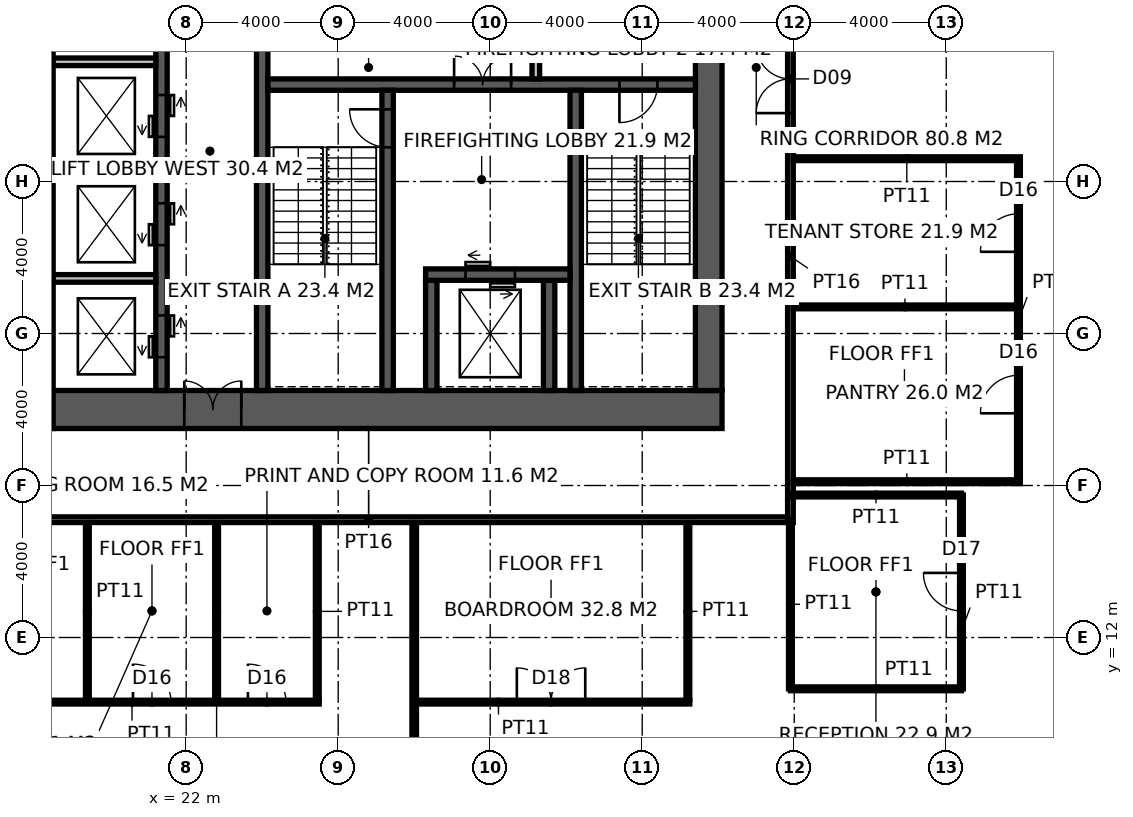
"""IFC4 building model, lengths in metres.
Left out: names, types, materials, properties, quantities, classifications, styles, units other than length and angle.
Written with IfcOpenShell. Run it as: python <this file> out.ifc"""

import sys

from ifc_helpers import new_model, si_unit, direction, frame, frame_2d, origin, place, context, subcontext, project, spatial, rectangle, extrude, element, fill, save


model = new_model("IFC4")
c1 = context("Model", 3, precision=1e-05, world=origin(), true_north=direction((0.0, 1.0)))
c2 = subcontext(c1, "Body", "Model", "MODEL_VIEW")
j1 = project(units=[si_unit("LENGTHUNIT", "METRE"), si_unit("PLANEANGLEUNIT", "RADIAN")], contexts=[c1])
p1 = place(None, origin())
s1 = spatial("IfcSite", under=j1, at=p1, CompositionType="ELEMENT")
p2 = place(p1, origin())
s2 = spatial("IfcBuilding", under=s1, at=p2, CompositionType="ELEMENT")
p3 = place(p2, frame((0.0, 0.0, 81.4)))
s3 = spatial("IfcBuildingStorey", under=s2, at=p3, CompositionType="ELEMENT", Elevation=81.4)
p4 = place(p3, frame((18.0, 17.5, -0.15), z_axis=(0.0, 0.0, 1.0), x_axis=(0.0, 1.0, 0.0)))
e1 = element("IfcWall", 1, at=p4, inside=s3, PredefinedType="SHEAR", context=c2, shape_type="SweptSolid", body=[
    extrude(rectangle(XDim=19.0, YDim=1.0, at=frame_2d((9.5, 0.0))), origin(), (0.0, 0.0, 1.0), 4.0),
])
p5 = place(p3, frame((18.5, 18.0, -0.15), z_axis=(0.0, 0.0, 1.0), x_axis=(1.0, 0.0, 0.0)))
e2 = element("IfcWall", 2, at=p5, inside=s3, PredefinedType="SHEAR", context=c2, shape_type="SweptSolid", body=[
    extrude(rectangle(XDim=17.6, YDim=1.0, at=frame_2d((8.8, 0.0))), origin(), (0.0, 0.0, 1.0), 4.0),
])
p6 = place(p5, frame((3.45, 0.0, 0.15)))
e3 = element("IfcOpeningElement", 3, at=p6, cuts=e2, PredefinedType="OPENING", context=c2, shape_type="SweptSolid", body=[
    extrude(rectangle(XDim=1.5, YDim=2.4, at=frame_2d((0.75, 1.2))), frame((0.0, 0.51, 0.0), z_axis=(0.0, -1.0, 0.0), x_axis=(1.0, 0.0, 0.0)), (0.0, 0.0, 1.0), 1.02),
])
p7 = place(p3, frame((35.75, 18.5, -0.15), z_axis=(0.0, 0.0, 1.0), x_axis=(0.0, 1.0, 0.0)))
e4 = element("IfcWall", 4, at=p7, inside=s3, PredefinedType="SHEAR", context=c2, shape_type="SweptSolid", body=[
    extrude(rectangle(XDim=17.0, YDim=0.7, at=frame_2d((8.5, 0.0))), origin(), (0.0, 0.0, 1.0), 4.0),
])
p8 = place(p7, frame((9.85, 0.0, 0.15)))
e5 = element("IfcOpeningElement", 5, at=p8, cuts=e4, PredefinedType="OPENING", context=c2, shape_type="SweptSolid", body=[
    extrude(rectangle(XDim=1.0, YDim=2.2, at=frame_2d((0.5, 1.1))), frame((0.0, 0.36, 0.0), z_axis=(0.0, -1.0, 0.0), x_axis=(1.0, 0.0, 0.0)), (0.0, 0.0, 1.0), 0.72),
])
p9 = place(p3, frame((24.0, 18.5, -0.15), z_axis=(0.0, 0.0, 1.0), x_axis=(0.0, 1.0, 0.0)))
e6 = element("IfcWall", 6, at=p9, inside=s3, PredefinedType="SHEAR", context=c2, shape_type="SweptSolid", body=[
    extrude(rectangle(XDim=17.0, YDim=0.3, at=frame_2d((8.5, 0.0))), origin(), (0.0, 0.0, 1.0), 4.0),
])
p10 = place(p9, frame((9.6, 0.0, 0.15)))
e7 = element("IfcOpeningElement", 7, at=p10, cuts=e6, PredefinedType="OPENING", context=c2, shape_type="SweptSolid", body=[
    extrude(rectangle(XDim=1.5, YDim=2.4, at=frame_2d((0.75, 1.2))), frame((0.0, 0.16, 0.0), z_axis=(0.0, -1.0, 0.0), x_axis=(1.0, 0.0, 0.0)), (0.0, 0.0, 1.0), 0.32),
])
p11 = place(p3, frame((24.15, 26.55, -0.15), z_axis=(0.0, 0.0, 1.0), x_axis=(1.0, 0.0, 0.0)))
e8 = element("IfcWall", 8, at=p11, inside=s3, PredefinedType="SHEAR", context=c2, shape_type="SweptSolid", body=[
    extrude(rectangle(XDim=11.25, YDim=0.3, at=frame_2d((5.625, 0.0))), origin(), (0.0, 0.0, 1.0), 4.0),
])
p12 = place(p11, frame((9.25, 0.0, 0.15)))
e9 = element("IfcOpeningElement", 9, at=p12, cuts=e8, PredefinedType="OPENING", context=c2, shape_type="SweptSolid", body=[
    extrude(rectangle(XDim=1.0, YDim=2.2, at=frame_2d((0.5, 1.1))), frame((0.0, 0.16, 0.0), z_axis=(0.0, -1.0, 0.0), x_axis=(1.0, 0.0, 0.0)), (0.0, 0.0, 1.0), 0.32),
])
p13 = place(p11, frame((4.9, 0.0, 0.15)))
e10 = element("IfcOpeningElement", 10, at=p13, cuts=e8, PredefinedType="OPENING", context=c2, shape_type="SweptSolid", body=[
    extrude(rectangle(XDim=1.5, YDim=2.4, at=frame_2d((0.75, 1.2))), frame((0.0, 0.16, 0.0), z_axis=(0.0, -1.0, 0.0), x_axis=(1.0, 0.0, 0.0)), (0.0, 0.0, 1.0), 0.32),
])
p14 = place(p3, frame((27.3, 18.5, -0.15), z_axis=(0.0, 0.0, 1.0), x_axis=(0.0, 1.0, 0.0)))
e11 = element("IfcWall", 11, at=p14, inside=s3, PredefinedType="SHEAR", context=c2, shape_type="SweptSolid", body=[
    extrude(rectangle(XDim=7.9, YDim=0.3, at=frame_2d((3.95, 0.0))), origin(), (0.0, 0.0, 1.0), 4.0),
])
p15 = place(p14, frame((6.4, 0.0, 0.15)))
e12 = element("IfcOpeningElement", 12, at=p15, cuts=e11, PredefinedType="OPENING", context=c2, shape_type="SweptSolid", body=[
    extrude(rectangle(XDim=1.0, YDim=2.2, at=frame_2d((0.5, 1.1))), frame((0.0, 0.16, 0.0), z_axis=(0.0, -1.0, 0.0), x_axis=(1.0, 0.0, 0.0)), (0.0, 0.0, 1.0), 0.32),
])
p16 = place(p3, frame((32.25, 18.5, -0.15), z_axis=(0.0, 0.0, 1.0), x_axis=(0.0, 1.0, 0.0)))
e13 = element("IfcWall", 13, at=p16, inside=s3, PredefinedType="SHEAR", context=c2, shape_type="SweptSolid", body=[
    extrude(rectangle(XDim=7.9, YDim=0.3, at=frame_2d((3.95, 0.0))), origin(), (0.0, 0.0, 1.0), 4.0),
])
for number, where, z_axis, x_axis in (
    (14, (28.45, 18.5, -0.15), (0.0, 0.0, 1.0), (0.0, 1.0, 0.0)),
    (15, (31.55, 18.5, -0.15), (0.0, 0.0, 1.0), (0.0, 1.0, 0.0)),
):
    element("IfcWall", number, at=place(p3, frame(where, z_axis=z_axis, x_axis=x_axis)), inside=s3, PredefinedType="SHEAR", context=c2, shape_type="SweptSolid", body=[
        extrude(rectangle(XDim=2.9, YDim=0.3, at=frame_2d((1.45, 0.0))), origin(), (0.0, 0.0, 1.0), 4.0),
    ])
p17 = place(p3, frame((28.3, 21.55, -0.15), z_axis=(0.0, 0.0, 1.0), x_axis=(1.0, 0.0, 0.0)))
e16 = element("IfcWall", 16, at=p17, inside=s3, PredefinedType="SHEAR", context=c2, shape_type="SweptSolid", body=[
    extrude(rectangle(XDim=3.8, YDim=0.3, at=frame_2d((1.9, 0.0))), origin(), (0.0, 0.0, 1.0), 4.0),
])
p18 = place(p17, frame((1.05, 0.0, 0.15)))
e17 = element("IfcOpeningElement", 17, at=p18, cuts=e16, PredefinedType="OPENING", context=c2, shape_type="SweptSolid", body=[
    extrude(rectangle(XDim=1.3, YDim=2.4, at=frame_2d((0.65, 1.2))), frame((0.0, 0.16, 0.0), z_axis=(0.0, -1.0, 0.0), x_axis=(1.0, 0.0, 0.0)), (0.0, 0.0, 1.0), 0.32),
])
p19 = place(p3, frame((21.35, 18.5, -0.15), z_axis=(0.0, 0.0, 1.0), x_axis=(0.0, 1.0, 0.0)))
e18 = element("IfcWall", 18, at=p19, inside=s3, PredefinedType="SHEAR", context=c2, shape_type="SweptSolid", body=[
    extrude(rectangle(XDim=12.5, YDim=0.3, at=frame_2d((6.25, 0.0))), origin(), (0.0, 0.0, 1.0), 4.0),
])
p20 = place(p19, frame((0.875, 0.0, 0.15)))
e19 = element("IfcOpeningElement", 19, at=p20, cuts=e18, PredefinedType="OPENING", context=c2, shape_type="SweptSolid", body=[
    extrude(rectangle(XDim=1.1, YDim=2.2, at=frame_2d((0.55, 1.1))), frame((0.0, 0.16, 0.0), z_axis=(0.0, -1.0, 0.0), x_axis=(1.0, 0.0, 0.0)), (0.0, 0.0, 1.0), 0.32),
])
p21 = place(p19, frame((3.825, 0.0, 0.15)))
e20 = element("IfcOpeningElement", 20, at=p21, cuts=e18, PredefinedType="OPENING", context=c2, shape_type="SweptSolid", body=[
    extrude(rectangle(XDim=1.1, YDim=2.2, at=frame_2d((0.55, 1.1))), frame((0.0, 0.16, 0.0), z_axis=(0.0, -1.0, 0.0), x_axis=(1.0, 0.0, 0.0)), (0.0, 0.0, 1.0), 0.32),
])
p22 = place(p19, frame((6.675, 0.0, 0.15)))
e21 = element("IfcOpeningElement", 21, at=p22, cuts=e18, PredefinedType="OPENING", context=c2, shape_type="SweptSolid", body=[
    extrude(rectangle(XDim=1.1, YDim=2.2, at=frame_2d((0.55, 1.1))), frame((0.0, 0.16, 0.0), z_axis=(0.0, -1.0, 0.0), x_axis=(1.0, 0.0, 0.0)), (0.0, 0.0, 1.0), 0.32),
])
p23 = place(p19, frame((9.575, 0.0, 0.15)))
e22 = element("IfcOpeningElement", 22, at=p23, cuts=e18, PredefinedType="OPENING", context=c2, shape_type="SweptSolid", body=[
    extrude(rectangle(XDim=1.1, YDim=2.2, at=frame_2d((0.55, 1.1))), frame((0.0, 0.16, 0.0), z_axis=(0.0, -1.0, 0.0), x_axis=(1.0, 0.0, 0.0)), (0.0, 0.0, 1.0), 0.32),
])
for number, where, z_axis, x_axis in (
    (23, (18.5, 21.45, -0.15), (0.0, 0.0, 1.0), (1.0, 0.0, 0.0)),
    (24, (18.5, 24.3, -0.15), (0.0, 0.0, 1.0), (1.0, 0.0, 0.0)),
    (25, (18.5, 27.15, -0.15), (0.0, 0.0, 1.0), (1.0, 0.0, 0.0)),
):
    element("IfcWall", number, at=place(p3, frame(where, z_axis=z_axis, x_axis=x_axis)), inside=s3, PredefinedType="SOLIDWALL", context=c2, shape_type="SweptSolid", body=[
        extrude(rectangle(XDim=2.7, YDim=0.2, at=frame_2d((1.35, 0.0))), origin(), (0.0, 0.0, 1.0), 4.0),
    ])
p24 = place(p3, frame((31.2, 26.7, 0.0), z_axis=(0.0, 0.0, 1.0), x_axis=(0.0, 1.0, 0.0)))
e26 = element("IfcWall", 26, at=p24, inside=s3, PredefinedType="SOLIDWALL", context=c2, shape_type="SweptSolid", body=[
    extrude(rectangle(XDim=4.3, YDim=0.2, at=frame_2d((2.15, 0.0))), origin(), (0.0, 0.0, 1.0), 3.85),
])
p25 = place(p3, frame((37.9, 15.025, 0.0), z_axis=(0.0, 0.0, 1.0), x_axis=(0.0, 1.0, 0.0)))
e27 = element("IfcWall", 27, at=p25, inside=s3, PredefinedType="PARTITIONING", context=c2, shape_type="SweptSolid", body=[
    extrude(rectangle(XDim=23.35, YDim=0.15, at=frame_2d((11.675, 0.0))), origin(), (0.0, 0.0, 1.0), 2.95),
])
p26 = place(p25, frame((10.775, 0.0, 0.0)))
e28 = element("IfcOpeningElement", 28, at=p26, cuts=e27, PredefinedType="OPENING", context=c2, shape_type="SweptSolid", body=[
    extrude(rectangle(XDim=1.8, YDim=2.4, at=frame_2d((0.9, 1.2))), frame((0.0, 0.085, 0.0), z_axis=(0.0, -1.0, 0.0), x_axis=(1.0, 0.0, 0.0)), (0.0, 0.0, 1.0), 0.17),
])
p27 = place(p3, frame((15.775, 15.1, 0.0), z_axis=(0.0, 0.0, 1.0), x_axis=(1.0, 0.0, 0.0)))
e29 = element("IfcWall", 29, at=p27, inside=s3, PredefinedType="PARTITIONING", context=c2, shape_type="SweptSolid", body=[
    extrude(rectangle(XDim=22.05, YDim=0.15, at=frame_2d((11.025, 0.0))), origin(), (0.0, 0.0, 1.0), 3.85),
])
p28 = place(p3, frame((28.0, 0.3, 0.0), z_axis=(0.0, 0.0, 1.0), x_axis=(0.0, 1.0, 0.0)))
e30 = element("IfcWall", 30, at=p28, inside=s3, PredefinedType="PARTITIONING", context=c2, shape_type="SweptSolid", body=[
    extrude(rectangle(XDim=14.725, YDim=0.12, at=frame_2d((7.362, 0.0))), origin(), (0.0, 0.0, 1.0), 3.85),
])
p29 = place(p3, frame((15.65, 10.3, 0.0), z_axis=(0.0, 0.0, 1.0), x_axis=(1.0, 0.0, 0.0)))
e31 = element("IfcWall", 31, at=p29, inside=s3, PredefinedType="PARTITIONING", context=c2, shape_type="SweptSolid", body=[
    extrude(rectangle(XDim=9.85, YDim=0.1, at=frame_2d((4.925, 0.0))), origin(), (0.0, 0.0, 1.0), 3.85),
])
p30 = place(p29, frame((1.4, 0.0, 0.0)))
e32 = element("IfcOpeningElement", 32, at=p30, cuts=e31, PredefinedType="OPENING", context=c2, shape_type="SweptSolid", body=[
    extrude(rectangle(XDim=1.0, YDim=2.2, at=frame_2d((0.5, 1.1))), frame((0.0, 0.06, 0.0), z_axis=(0.0, -1.0, 0.0), x_axis=(1.0, 0.0, 0.0)), (0.0, 0.0, 1.0), 0.12),
])
p31 = place(p29, frame((4.95, 0.0, 0.0)))
e33 = element("IfcOpeningElement", 33, at=p31, cuts=e31, PredefinedType="OPENING", context=c2, shape_type="SweptSolid", body=[
    extrude(rectangle(XDim=1.0, YDim=2.2, at=frame_2d((0.5, 1.1))), frame((0.0, 0.06, 0.0), z_axis=(0.0, -1.0, 0.0), x_axis=(1.0, 0.0, 0.0)), (0.0, 0.0, 1.0), 0.12),
])
p32 = place(p29, frame((7.975, 0.0, 0.0)))
e34 = element("IfcOpeningElement", 34, at=p32, cuts=e31, PredefinedType="OPENING", context=c2, shape_type="SweptSolid", body=[
    extrude(rectangle(XDim=1.0, YDim=2.2, at=frame_2d((0.5, 1.1))), frame((0.0, 0.06, 0.0), z_axis=(0.0, -1.0, 0.0), x_axis=(1.0, 0.0, 0.0)), (0.0, 0.0, 1.0), 0.12),
])
p33 = place(p3, frame((28.061, 10.3, 0.0), z_axis=(0.0, 0.0, 1.0), x_axis=(1.0, 0.0, 0.0)))
e35 = element("IfcWall", 35, at=p33, inside=s3, PredefinedType="PARTITIONING", context=c2, shape_type="SweptSolid", body=[
    extrude(rectangle(XDim=7.19, YDim=0.1, at=frame_2d((3.595, 0.0))), origin(), (0.0, 0.0, 1.0), 3.85),
])
p34 = place(p33, frame((2.64, 0.0, 0.0)))
e36 = element("IfcOpeningElement", 36, at=p34, cuts=e35, PredefinedType="OPENING", context=c2, shape_type="SweptSolid", body=[
    extrude(rectangle(XDim=1.8, YDim=2.4, at=frame_2d((0.9, 1.2))), frame((0.0, 0.06, 0.0), z_axis=(0.0, -1.0, 0.0), x_axis=(1.0, 0.0, 0.0)), (0.0, 0.0, 1.0), 0.12),
])
p35 = place(p3, frame((37.975, 16.1, 0.0), z_axis=(0.0, 0.0, 1.0), x_axis=(1.0, 0.0, 0.0)))
e37 = element("IfcWall", 37, at=p35, inside=s3, PredefinedType="PARTITIONING", context=c2, shape_type="SweptSolid", body=[
    extrude(rectangle(XDim=5.975, YDim=0.1, at=frame_2d((2.987, 0.0))), origin(), (0.0, 0.0, 1.0), 3.85),
])
p36 = place(p3, frame((37.975, 20.7, 0.0), z_axis=(0.0, 0.0, 1.0), x_axis=(1.0, 0.0, 0.0)))
e38 = element("IfcWall", 38, at=p36, inside=s3, PredefinedType="PARTITIONING", context=c2, shape_type="SweptSolid", body=[
    extrude(rectangle(XDim=5.875, YDim=0.1, at=frame_2d((2.938, 0.0))), origin(), (0.0, 0.0, 1.0), 3.85),
])
p37 = place(p3, frame((37.975, 24.6, 0.0), z_axis=(0.0, 0.0, 1.0), x_axis=(1.0, 0.0, 0.0)))
e39 = element("IfcWall", 39, at=p37, inside=s3, PredefinedType="PARTITIONING", context=c2, shape_type="SweptSolid", body=[
    extrude(rectangle(XDim=5.975, YDim=0.1, at=frame_2d((2.987, 0.0))), origin(), (0.0, 0.0, 1.0), 3.85),
])
for number, where, z_axis, x_axis in (
    (40, (19.4, 10.35, 0.0), (0.0, 0.0, 1.0), (0.0, 1.0, 0.0)),
    (41, (22.8, 10.35, 0.0), (0.0, 0.0, 1.0), (0.0, 1.0, 0.0)),
    (42, (25.45, 10.35, 0.0), (0.0, 0.0, 1.0), (0.0, 1.0, 0.0)),
    (43, (35.201, 10.35, 0.0), (0.0, 0.0, 1.0), (0.0, 1.0, 0.0)),
):
    element("IfcWall", number, at=place(p3, frame(where, z_axis=z_axis, x_axis=x_axis)), inside=s3, PredefinedType="PARTITIONING", context=c2, shape_type="SweptSolid", body=[
        extrude(rectangle(XDim=4.675, YDim=0.1, at=frame_2d((2.337, 0.0))), origin(), (0.0, 0.0, 1.0), 3.85),
    ])
p38 = place(p3, frame((43.9, 16.15, 0.0), z_axis=(0.0, 0.0, 1.0), x_axis=(0.0, 1.0, 0.0)))
e44 = element("IfcWall", 44, at=p38, inside=s3, PredefinedType="PARTITIONING", context=c2, shape_type="SweptSolid", body=[
    extrude(rectangle(XDim=8.4, YDim=0.1, at=frame_2d((4.2, 0.0))), origin(), (0.0, 0.0, 1.0), 3.85),
])
p39 = place(p38, frame((1.75, 0.0, 0.0)))
e45 = element("IfcOpeningElement", 45, at=p39, cuts=e44, PredefinedType="OPENING", context=c2, shape_type="SweptSolid", body=[
    extrude(rectangle(XDim=1.0, YDim=2.2, at=frame_2d((0.5, 1.1))), frame((0.0, 0.06, 0.0), z_axis=(0.0, -1.0, 0.0), x_axis=(1.0, 0.0, 0.0)), (0.0, 0.0, 1.0), 0.12),
])
p40 = place(p38, frame((6.0, 0.0, 0.0)))
e46 = element("IfcOpeningElement", 46, at=p40, cuts=e44, PredefinedType="OPENING", context=c2, shape_type="SweptSolid", body=[
    extrude(rectangle(XDim=1.0, YDim=2.2, at=frame_2d((0.5, 1.1))), frame((0.0, 0.06, 0.0), z_axis=(0.0, -1.0, 0.0), x_axis=(1.0, 0.0, 0.0)), (0.0, 0.0, 1.0), 0.12),
])
p41 = place(p3, frame((37.9, 15.1, 0.0), z_axis=(0.0, 0.0, 1.0), x_axis=(0.0, -1.0, 0.0)))
e47 = element("IfcWall", 47, at=p41, inside=s3, PredefinedType="PARTITIONING", context=c2, shape_type="SweptSolid", body=[
    extrude(rectangle(XDim=4.45, YDim=0.1, at=frame_2d((2.225, 0.0))), origin(), (0.0, 0.0, 1.0), 2.95),
])
p42 = place(p3, frame((37.9, 10.65, 0.0), z_axis=(0.0, 0.0, 1.0), x_axis=(1.0, 0.0, 0.0)))
e48 = element("IfcWall", 48, at=p42, inside=s3, PredefinedType="PARTITIONING", context=c2, shape_type="SweptSolid", body=[
    extrude(rectangle(XDim=4.5, YDim=0.1, at=frame_2d((2.25, 0.0))), origin(), (0.0, 0.0, 1.0), 3.85),
])
p43 = place(p3, frame((42.4, 10.65, 0.0), z_axis=(0.0, 0.0, 1.0), x_axis=(0.0, 1.0, 0.0)))
e49 = element("IfcWall", 49, at=p43, inside=s3, PredefinedType="PARTITIONING", context=c2, shape_type="SweptSolid", body=[
    extrude(rectangle(XDim=5.1, YDim=0.1, at=frame_2d((2.55, 0.0))), origin(), (0.0, 0.0, 1.0), 3.85),
])
p44 = place(p43, frame((2.05, 0.0, 0.0)))
e50 = element("IfcOpeningElement", 50, at=p44, cuts=e49, PredefinedType="OPENING", context=c2, shape_type="SweptSolid", body=[
    extrude(rectangle(XDim=1.0, YDim=2.2, at=frame_2d((0.5, 1.1))), frame((0.0, 0.06, 0.0), z_axis=(0.0, -1.0, 0.0), x_axis=(1.0, 0.0, 0.0)), (0.0, 0.0, 1.0), 0.12),
])
p45 = place(p3, frame((42.4, 15.75, 0.0), z_axis=(0.0, 0.0, 1.0), x_axis=(-1.0, 0.0, 0.0)))
e51 = element("IfcWall", 51, at=p45, inside=s3, PredefinedType="PARTITIONING", context=c2, shape_type="SweptSolid", body=[
    extrude(rectangle(XDim=4.5, YDim=0.1, at=frame_2d((2.25, 0.0))), origin(), (0.0, 0.0, 1.0), 3.85),
])
p46 = place(p15, origin())
e52 = element("IfcDoor", 52, at=p46, inside=s3, OperationType="SINGLE_SWING_RIGHT", PredefinedType="DOOR", context=c2, shape_type="SweptSolid", body=[
    extrude(rectangle(XDim=1.0, YDim=2.2, at=frame_2d((0.5, 1.1))), frame((0.0, 0.025, 0.0), z_axis=(0.0, -1.0, 0.0), x_axis=(1.0, 0.0, 0.0)), (0.0, 0.0, 1.0), 0.05),
])
fill(e12, e52)
p47 = place(p12, frame((1.0, 0.0, 0.0), z_axis=(0.0, 0.0, 1.0), x_axis=(-1.0, 0.0, 0.0)))
e53 = element("IfcDoor", 53, at=p47, inside=s3, OperationType="SINGLE_SWING_RIGHT", PredefinedType="DOOR", context=c2, shape_type="SweptSolid", body=[
    extrude(rectangle(XDim=1.0, YDim=2.2, at=frame_2d((0.5, 1.1))), frame((0.0, 0.025, 0.0), z_axis=(0.0, -1.0, 0.0), x_axis=(1.0, 0.0, 0.0)), (0.0, 0.0, 1.0), 0.05),
])
fill(e9, e53)
p48 = place(p13, origin())
e54 = element("IfcDoor", 54, at=p48, inside=s3, OperationType="DOUBLE_DOOR_DOUBLE_SWING", PredefinedType="DOOR", context=c2, shape_type="SweptSolid", body=[
    extrude(rectangle(XDim=1.5, YDim=2.4, at=frame_2d((0.75, 1.2))), frame((0.0, 0.025, 0.0), z_axis=(0.0, -1.0, 0.0), x_axis=(1.0, 0.0, 0.0)), (0.0, 0.0, 1.0), 0.05),
])
fill(e10, e54)
p49 = place(p6, origin())
e55 = element("IfcDoor", 55, at=p49, inside=s3, OperationType="DOUBLE_DOOR_DOUBLE_SWING", PredefinedType="DOOR", context=c2, shape_type="SweptSolid", body=[
    extrude(rectangle(XDim=1.5, YDim=2.4, at=frame_2d((0.75, 1.2))), frame((0.0, 0.025, 0.0), z_axis=(0.0, -1.0, 0.0), x_axis=(1.0, 0.0, 0.0)), (0.0, 0.0, 1.0), 0.05),
])
fill(e3, e55)
p50 = place(p26, origin())
e56 = element("IfcDoor", 56, at=p50, inside=s3, OperationType="DOUBLE_DOOR_DOUBLE_SWING", PredefinedType="DOOR", context=c2, shape_type="SweptSolid", body=[
    extrude(rectangle(XDim=1.8, YDim=2.4, at=frame_2d((0.9, 1.2))), frame((0.0, 0.025, 0.0), z_axis=(0.0, -1.0, 0.0), x_axis=(1.0, 0.0, 0.0)), (0.0, 0.0, 1.0), 0.05),
])
fill(e28, e56)
p51 = place(p31, origin())
e57 = element("IfcDoor", 57, at=p51, inside=s3, OperationType="SINGLE_SWING_LEFT", PredefinedType="DOOR", context=c2, shape_type="SweptSolid", body=[
    extrude(rectangle(XDim=1.0, YDim=2.2, at=frame_2d((0.5, 1.1))), frame((0.0, 0.025, 0.0), z_axis=(0.0, -1.0, 0.0), x_axis=(1.0, 0.0, 0.0)), (0.0, 0.0, 1.0), 0.05),
])
fill(e33, e57)
p52 = place(p32, origin())
e58 = element("IfcDoor", 58, at=p52, inside=s3, OperationType="SINGLE_SWING_LEFT", PredefinedType="DOOR", context=c2, shape_type="SweptSolid", body=[
    extrude(rectangle(XDim=1.0, YDim=2.2, at=frame_2d((0.5, 1.1))), frame((0.0, 0.025, 0.0), z_axis=(0.0, -1.0, 0.0), x_axis=(1.0, 0.0, 0.0)), (0.0, 0.0, 1.0), 0.05),
])
fill(e34, e58)
p53 = place(p34, origin())
e59 = element("IfcDoor", 59, at=p53, inside=s3, OperationType="DOUBLE_DOOR_DOUBLE_SWING", PredefinedType="DOOR", context=c2, shape_type="SweptSolid", body=[
    extrude(rectangle(XDim=1.8, YDim=2.4, at=frame_2d((0.9, 1.2))), frame((0.0, 0.025, 0.0), z_axis=(0.0, -1.0, 0.0), x_axis=(1.0, 0.0, 0.0)), (0.0, 0.0, 1.0), 0.05),
])
fill(e36, e59)
p54 = place(p39, origin())
e60 = element("IfcDoor", 60, at=p54, inside=s3, OperationType="SINGLE_SWING_LEFT", PredefinedType="DOOR", context=c2, shape_type="SweptSolid", body=[
    extrude(rectangle(XDim=1.0, YDim=2.2, at=frame_2d((0.5, 1.1))), frame((0.0, 0.025, 0.0), z_axis=(0.0, -1.0, 0.0), x_axis=(1.0, 0.0, 0.0)), (0.0, 0.0, 1.0), 0.05),
])
fill(e45, e60)
p55 = place(p40, origin())
e61 = element("IfcDoor", 61, at=p55, inside=s3, OperationType="SINGLE_SWING_LEFT", PredefinedType="DOOR", context=c2, shape_type="SweptSolid", body=[
    extrude(rectangle(XDim=1.0, YDim=2.2, at=frame_2d((0.5, 1.1))), frame((0.0, 0.025, 0.0), z_axis=(0.0, -1.0, 0.0), x_axis=(1.0, 0.0, 0.0)), (0.0, 0.0, 1.0), 0.05),
])
fill(e46, e61)
p56 = place(p44, origin())
e62 = element("IfcDoor", 62, at=p56, inside=s3, OperationType="SINGLE_SWING_RIGHT", PredefinedType="DOOR", context=c2, shape_type="SweptSolid", body=[
    extrude(rectangle(XDim=1.0, YDim=2.2, at=frame_2d((0.5, 1.1))), frame((0.0, 0.025, 0.0), z_axis=(0.0, -1.0, 0.0), x_axis=(1.0, 0.0, 0.0)), (0.0, 0.0, 1.0), 0.05),
])
fill(e50, e62)
p57 = place(p18, origin())
e63 = element("IfcDoor", 63, at=p57, inside=s3, OperationType="DOUBLE_DOOR_SLIDING", PredefinedType="DOOR", context=c2, shape_type="SweptSolid", body=[
    extrude(rectangle(XDim=1.3, YDim=2.4, at=frame_2d((0.65, 1.2))), frame((0.0, 0.025, 0.0), z_axis=(0.0, -1.0, 0.0), x_axis=(1.0, 0.0, 0.0)), (0.0, 0.0, 1.0), 0.05),
])
fill(e17, e63)
p58 = place(p20, origin())
e64 = element("IfcDoor", 64, at=p58, inside=s3, OperationType="DOUBLE_DOOR_SLIDING", PredefinedType="DOOR", context=c2, shape_type="SweptSolid", body=[
    extrude(rectangle(XDim=1.1, YDim=2.2, at=frame_2d((0.55, 1.1))), frame((0.0, 0.025, 0.0), z_axis=(0.0, -1.0, 0.0), x_axis=(1.0, 0.0, 0.0)), (0.0, 0.0, 1.0), 0.05),
])
fill(e19, e64)
p59 = place(p21, origin())
e65 = element("IfcDoor", 65, at=p59, inside=s3, OperationType="DOUBLE_DOOR_SLIDING", PredefinedType="DOOR", context=c2, shape_type="SweptSolid", body=[
    extrude(rectangle(XDim=1.1, YDim=2.2, at=frame_2d((0.55, 1.1))), frame((0.0, 0.025, 0.0), z_axis=(0.0, -1.0, 0.0), x_axis=(1.0, 0.0, 0.0)), (0.0, 0.0, 1.0), 0.05),
])
fill(e20, e65)
p60 = place(p22, origin())
e66 = element("IfcDoor", 66, at=p60, inside=s3, OperationType="DOUBLE_DOOR_SLIDING", PredefinedType="DOOR", context=c2, shape_type="SweptSolid", body=[
    extrude(rectangle(XDim=1.1, YDim=2.2, at=frame_2d((0.55, 1.1))), frame((0.0, 0.025, 0.0), z_axis=(0.0, -1.0, 0.0), x_axis=(1.0, 0.0, 0.0)), (0.0, 0.0, 1.0), 0.05),
])
fill(e21, e66)
save(model, sys.argv[1])
